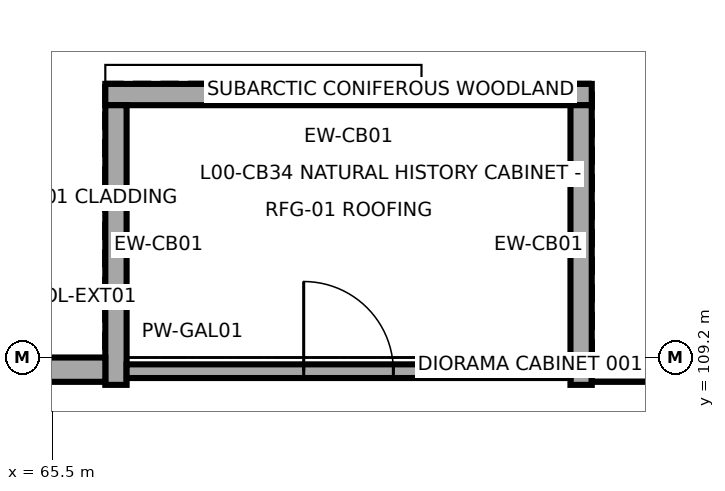
"""IFC4 building model, lengths in metres.
Left out: names, types, materials, properties, quantities, classifications, styles, units other than length and angle.
Written with IfcOpenShell. Run it as: python <this file> out.ifc"""

import sys

from ifc_helpers import new_model, si_unit, direction, frame, frame_2d, origin, place, context, subcontext, project, spatial, rectangle, extrude, element, fill, save


model = new_model("IFC4")
c1 = context("Model", 3, precision=1e-05, world=origin(), true_north=direction((0.0, 1.0)))
c2 = subcontext(c1, "Body", "Model", "MODEL_VIEW")
j1 = project(units=[si_unit("LENGTHUNIT", "METRE"), si_unit("PLANEANGLEUNIT", "RADIAN")], contexts=[c1])
p1 = place(None, origin())
s1 = spatial("IfcSite", under=j1, at=p1, CompositionType="ELEMENT")
p2 = place(p1, origin())
s2 = spatial("IfcBuilding", under=s1, at=p2, CompositionType="ELEMENT")
p3 = place(p2, origin())
s3 = spatial("IfcBuildingStorey", under=s2, at=p3, CompositionType="ELEMENT", Elevation=0.0)
p4 = place(p3, frame((72.6, 112.66, 0.0), z_axis=(0.0, 0.0, 1.0), x_axis=(-1.0, 0.0, 0.0)))
e1 = element("IfcWall", 1, at=p4, inside=s3, PredefinedType="SOLIDWALL", context=c2, shape_type="SweptSolid", body=[
    extrude(rectangle(XDim=6.4, YDim=0.28, at=frame_2d((3.2, 0.0))), origin(), (0.0, 0.0, 1.0), 2.99),
])
for number, where, z_axis, x_axis in (
    (2, (66.34, 112.52, 0.0), (0.0, 0.0, 1.0), (0.0, -1.0, 0.0)),
    (3, (72.46, 108.84, 0.0), (0.0, 0.0, 1.0), (0.0, 1.0, 0.0)),
):
    element("IfcWall", number, at=place(p3, frame(where, z_axis=z_axis, x_axis=x_axis)), inside=s3, PredefinedType="SOLIDWALL", context=c2, shape_type="SweptSolid", body=[
        extrude(rectangle(XDim=3.68, YDim=0.28, at=frame_2d((1.84, 0.0))), origin(), (0.0, 0.0, 1.0), 2.99),
    ])
for number, where, z_axis, x_axis in (
    (4, (66.2, 109.04, 0.0), (0.0, 0.0, 1.0), (-1.0, 0.0, 0.0)),
    (5, (73.45, 109.04, 0.0), (0.0, 0.0, 1.0), (-1.0, 0.0, 0.0)),
):
    element("IfcWall", number, at=place(p3, frame(where, z_axis=z_axis, x_axis=x_axis)), inside=s3, PredefinedType="SOLIDWALL", context=c2, shape_type="SweptSolid", body=[
        extrude(rectangle(XDim=0.85, YDim=0.32, at=frame_2d((0.425, 0.0))), origin(), (0.0, 0.0, 1.0), 2.992),
    ])
p5 = place(p3, frame((66.48, 109.02, 0.0), z_axis=(0.0, 0.0, 1.0), x_axis=(1.0, 0.0, 0.0)))
e6 = element("IfcWall", 6, at=p5, inside=s3, PredefinedType="PARTITIONING", context=c2, shape_type="SweptSolid", body=[
    extrude(rectangle(XDim=5.84, YDim=0.18, at=frame_2d((2.92, 0.0))), origin(), (0.0, 0.0, 1.0), 2.99),
])
p6 = place(p5, frame((2.33, 0.0, 0.0)))
e7 = element("IfcOpeningElement", 7, at=p6, cuts=e6, PredefinedType="OPENING", context=c2, shape_type="SweptSolid", body=[
    extrude(rectangle(XDim=1.18, YDim=2.25, at=frame_2d((0.59, 1.125))), frame((0.0, 0.1, 0.0), z_axis=(0.0, -1.0, 0.0), x_axis=(1.0, 0.0, 0.0)), (0.0, 0.0, 1.0), 0.2),
])
p7 = place(p6, origin())
e8 = element("IfcDoor", 8, at=p7, inside=s3, OperationType="SINGLE_SWING_LEFT", PredefinedType="DOOR", context=c2, shape_type="SweptSolid", body=[
    extrude(rectangle(XDim=1.18, YDim=2.25, at=frame_2d((0.59, 1.125))), frame((0.0, 0.025, 0.0), z_axis=(0.0, -1.0, 0.0), x_axis=(1.0, 0.0, 0.0)), (0.0, 0.0, 1.0), 0.05),
])
fill(e7, e8)
save(model, sys.argv[1])
